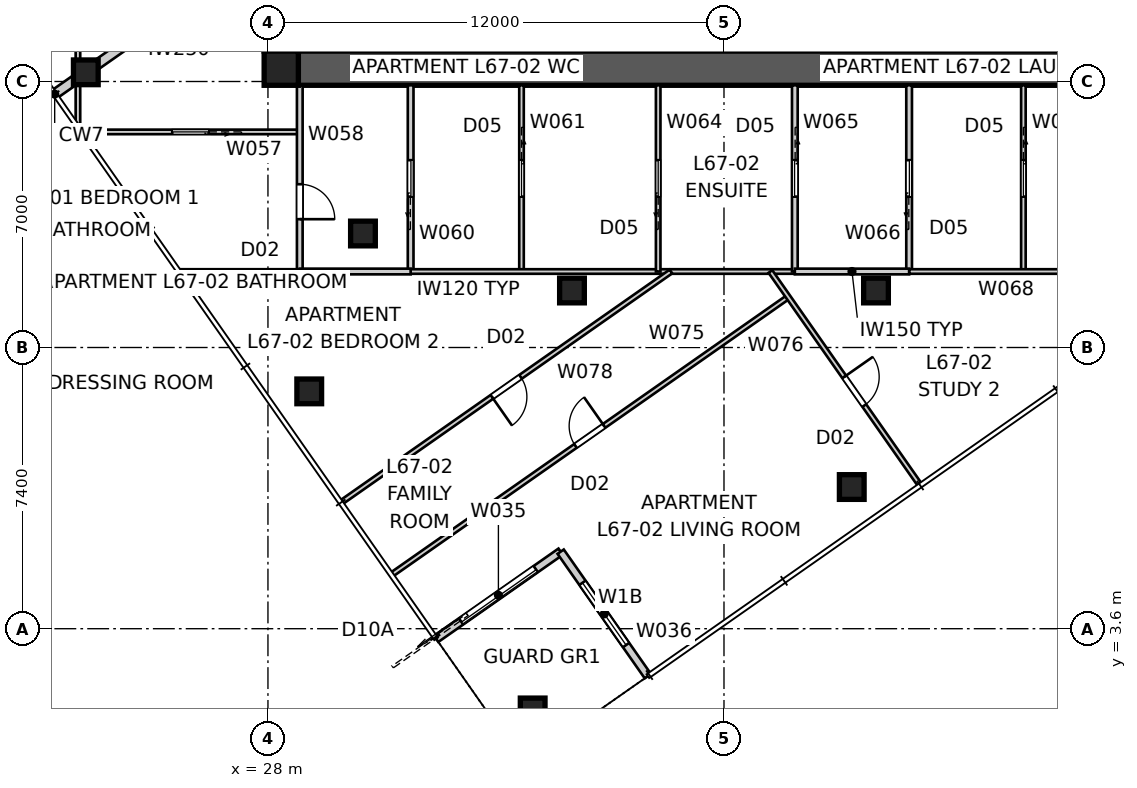
"""IFC4 building model, lengths in metres.
Left out: names, types, materials, properties, quantities, classifications, styles, units other than length and angle.
Written with IfcOpenShell. Run it as: python <this file> out.ifc"""

import sys

from ifc_helpers import new_model, si_unit, direction, frame, frame_2d, origin, origin_2d, place, context, subcontext, project, spatial, polyline, rectangle, outline, extrude, element, fill, save


model = new_model("IFC4")
c1 = context("Model", 3, precision=1e-05, world=origin(), true_north=direction((0.0, 1.0)))
c2 = subcontext(c1, "Body", "Model", "MODEL_VIEW")
j1 = project(units=[si_unit("LENGTHUNIT", "METRE"), si_unit("PLANEANGLEUNIT", "RADIAN")], contexts=[c1])
p1 = place(None, origin())
s1 = spatial("IfcSite", under=j1, at=p1, CompositionType="ELEMENT")
p2 = place(p1, origin())
s2 = spatial("IfcBuilding", under=s1, at=p2, CompositionType="ELEMENT")
p3 = place(p2, frame((0.0, 0.0, 243.8)))
s3 = spatial("IfcBuildingStorey", under=s2, at=p3, CompositionType="ELEMENT", Elevation=243.8)
p4 = place(p3, frame((51.2, 18.35, 0.0), z_axis=(0.0, 0.0, 1.0), x_axis=(-1.0, 0.0, 0.0)))
e1 = element("IfcWall", 1, at=p4, inside=s3, PredefinedType="SHEAR", context=c2, shape_type="SweptSolid", body=[
    extrude(outline(polyline([(0.0, -0.45), (22.4, -0.45), (22.4, -0.025), (22.85, -0.025), (22.85, 0.025), (22.4, 0.025), (22.4, 0.45), (0.0, 0.45), (0.0, 0.025), (-0.45, 0.025), (-0.45, -0.025), (0.0, -0.025), (0.0, -0.45)])), origin(), (0.0, 0.0, 1.0), 3.4),
])
p5 = place(p3, frame((28.35, 41.2, 0.0), z_axis=(0.0, 0.0, 1.0), x_axis=(0.0, -1.0, 0.0)))
e2 = element("IfcWall", 2, at=p5, inside=s3, PredefinedType="SHEAR", context=c2, shape_type="SweptSolid", body=[
    extrude(outline(polyline([(0.0, -0.45), (22.4, -0.45), (22.4, -0.025), (22.85, -0.025), (22.85, 0.025), (22.4, 0.025), (22.4, 0.45), (0.0, 0.45), (0.0, 0.025), (-0.45, 0.025), (-0.45, -0.025), (0.0, -0.025), (0.0, -0.45)])), origin(), (0.0, 0.0, 1.0), 3.4),
])
p6 = place(p5, frame((11.14, 0.0, 0.0)))
e3 = element("IfcOpeningElement", 3, at=p6, cuts=e2, PredefinedType="OPENING", context=c2, shape_type="SweptSolid", body=[
    extrude(rectangle(XDim=1.02, YDim=2.4, at=frame_2d((0.51, 1.2))), frame((0.0, 0.46, 0.0), z_axis=(0.0, -1.0, 0.0), x_axis=(1.0, 0.0, 0.0)), (0.0, 0.0, 1.0), 0.92),
])
p7 = place(p3, frame((28.35, 18.35, 0.0), z_axis=(0.0, 0.0, 1.0), x_axis=(1.0, 0.0, 0.0)))
e4 = element("IfcColumn", 4, at=p7, inside=s3, PredefinedType="COLUMN", context=c2, shape_type="SweptSolid", body=[
    extrude(rectangle(XDim=0.9, YDim=0.9, at=origin_2d()), origin(), (0.0, 0.0, 1.0), 3.4),
])
for number, where, z_axis, x_axis in (
    (5, (34.966, 1.449, 0.0), (0.0, 0.0, 1.0), (1.0, 0.0, 0.0)),
    (6, (43.362, 7.328, 0.0), (0.0, 0.0, 1.0), (1.0, 0.0, 0.0)),
    (7, (23.207, 18.242, 0.0), (0.0, 0.0, 1.0), (1.0, 0.0, 0.0)),
    (8, (29.086, 9.845, 0.0), (0.0, 0.0, 1.0), (1.0, 0.0, 0.0)),
    (9, (30.5, 14.0, 0.0), (0.0, 0.0, 1.0), (1.0, 0.0, 0.0)),
    (10, (36.0, 12.5, 0.0), (0.0, 0.0, 1.0), (1.0, 0.0, 0.0)),
    (11, (44.0, 12.5, 0.0), (0.0, 0.0, 1.0), (1.0, 0.0, 0.0)),
):
    element("IfcColumn", number, at=place(p3, frame(where, z_axis=z_axis, x_axis=x_axis)), inside=s3, PredefinedType="COLUMN", context=c2, shape_type="SweptSolid", body=[
        extrude(rectangle(XDim=0.65, YDim=0.65, at=origin_2d()), origin(), (0.0, 0.0, 1.0), 3.4),
    ])
p8 = place(p3, frame((32.426, 3.333, 0.0), z_axis=(0.0, 0.0, 1.0), x_axis=(0.819165963305, 0.573556557423, 0.0)))
e12 = element("IfcWall", 12, at=p8, inside=s3, PredefinedType="SOLIDWALL", context=c2, shape_type="SweptSolid", body=[
    extrude(rectangle(XDim=4.0, YDim=0.2, at=frame_2d((2.0, 0.0))), origin(), (0.0, 0.0, 1.0), 3.25),
])
p9 = place(p8, frame((0.8, 0.0, 0.0)))
e13 = element("IfcOpeningElement", 13, at=p9, cuts=e12, PredefinedType="OPENING", context=c2, shape_type="SweptSolid", body=[
    extrude(rectangle(XDim=2.4, YDim=2.1, at=frame_2d((1.2, 1.05))), frame((0.0, 0.11, 0.0), z_axis=(0.0, -1.0, 0.0), x_axis=(1.0, 0.0, 0.0)), (0.0, 0.0, 1.0), 0.22),
])
p10 = place(p3, frame((35.702, 5.627, 0.0), z_axis=(0.0, 0.0, 1.0), x_axis=(0.573597512525, -0.819137286189, 0.0)))
e14 = element("IfcWall", 14, at=p10, inside=s3, PredefinedType="SOLIDWALL", context=c2, shape_type="SweptSolid", body=[
    extrude(rectangle(XDim=4.0, YDim=0.2, at=frame_2d((2.0, 0.0))), origin(), (0.0, 0.0, 1.0), 3.25),
])
p11 = place(p10, frame((1.0, 0.0, 0.45)))
e15 = element("IfcOpeningElement", 15, at=p11, cuts=e14, PredefinedType="OPENING", context=c2, shape_type="SweptSolid", body=[
    extrude(rectangle(XDim=2.0, YDim=1.8, at=frame_2d((1.0, 0.9))), frame((0.0, 0.11, 0.0), z_axis=(0.0, -1.0, 0.0), x_axis=(1.0, 0.0, 0.0)), (0.0, 0.0, 1.0), 0.22),
])
p12 = place(p3, frame((22.388, 17.668, 0.0), z_axis=(0.0, 0.0, 1.0), x_axis=(0.819161528122, 0.573562891796, 0.0)))
e16 = element("IfcWall", 16, at=p12, inside=s3, PredefinedType="PARTITIONING", context=c2, shape_type="SweptSolid", body=[
    extrude(rectangle(XDim=6.681, YDim=0.25, at=frame_2d((3.341, 0.0))), origin(), (0.0, 0.0, 1.0), 3.25),
])
p13 = place(p3, frame((23.0, 16.864, 0.0), z_axis=(0.0, 0.0, 1.0), x_axis=(0.0, 1.0, 0.0)))
e17 = element("IfcWall", 17, at=p13, inside=s3, PredefinedType="PARTITIONING", context=c2, shape_type="SweptSolid", body=[
    extrude(rectangle(XDim=19.28, YDim=0.12, at=frame_2d((9.64, 0.0))), origin(), (0.0, 0.0, 1.0), 2.55),
])
p14 = place(p13, frame((9.599, 0.0, 0.0)))
e18 = element("IfcOpeningElement", 18, at=p14, cuts=e17, PredefinedType="OPENING", context=c2, shape_type="SweptSolid", body=[
    extrude(rectangle(XDim=0.92, YDim=2.34, at=frame_2d((0.46, 1.17))), frame((0.0, 0.07, 0.0), z_axis=(0.0, -1.0, 0.0), x_axis=(1.0, 0.0, 0.0)), (0.0, 0.0, 1.0), 0.14),
])
p15 = place(p13, frame((17.603, 0.0, 0.0)))
e19 = element("IfcOpeningElement", 19, at=p15, cuts=e17, PredefinedType="OPENING", context=c2, shape_type="SweptSolid", body=[
    extrude(rectangle(XDim=0.92, YDim=2.34, at=frame_2d((0.46, 1.17))), frame((0.0, 0.07, 0.0), z_axis=(0.0, -1.0, 0.0), x_axis=(1.0, 0.0, 0.0)), (0.0, 0.0, 1.0), 0.14),
])
p16 = place(p13, frame((12.806, 0.0, 0.0)))
e20 = element("IfcOpeningElement", 20, at=p16, cuts=e17, PredefinedType="OPENING", context=c2, shape_type="SweptSolid", body=[
    extrude(rectangle(XDim=0.92, YDim=2.34, at=frame_2d((0.46, 1.17))), frame((0.0, 0.07, 0.0), z_axis=(0.0, -1.0, 0.0), x_axis=(1.0, 0.0, 0.0)), (0.0, 0.0, 1.0), 0.14),
])
p17 = place(p3, frame((28.837, 16.673, 0.0), z_axis=(0.0, 0.0, 1.0), x_axis=(-1.0, 0.0, 0.0)))
e21 = element("IfcWall", 21, at=p17, inside=s3, PredefinedType="PARTITIONING", context=c2, shape_type="SweptSolid", body=[
    extrude(rectangle(XDim=5.704, YDim=0.12, at=frame_2d((2.852, 0.0))), origin(), (0.0, 0.0, 1.0), 3.25),
])
p18 = place(p17, frame((2.396, 0.0, 0.0)))
e22 = element("IfcOpeningElement", 22, at=p18, cuts=e21, PredefinedType="OPENING", context=c2, shape_type="SweptSolid", body=[
    extrude(rectangle(XDim=0.96, YDim=2.1, at=frame_2d((0.48, 1.05))), frame((0.0, 0.07, 0.0), z_axis=(0.0, -1.0, 0.0), x_axis=(1.0, 0.0, 0.0)), (0.0, 0.0, 1.0), 0.14),
])
p19 = place(p3, frame((28.837, 17.9, 0.0), z_axis=(0.0, 0.0, 1.0), x_axis=(0.0, -1.0, 0.0)))
e23 = element("IfcWall", 23, at=p19, inside=s3, PredefinedType="SOLIDWALL", context=c2, shape_type="SweptSolid", body=[
    extrude(rectangle(XDim=4.9, YDim=0.15, at=frame_2d((2.45, 0.0))), origin(), (0.0, 0.0, 1.0), 3.25),
])
p20 = place(p19, frame((2.603, 0.0, 0.0)))
e24 = element("IfcOpeningElement", 24, at=p20, cuts=e23, PredefinedType="OPENING", context=c2, shape_type="SweptSolid", body=[
    extrude(rectangle(XDim=0.92, YDim=2.34, at=frame_2d((0.46, 1.17))), frame((0.0, 0.085, 0.0), z_axis=(0.0, -1.0, 0.0), x_axis=(1.0, 0.0, 0.0)), (0.0, 0.0, 1.0), 0.17),
])
p21 = place(p3, frame((28.837, 13.0, 0.0), z_axis=(0.0, 0.0, 1.0), x_axis=(-1.0, 0.0, 0.0)))
e25 = element("IfcWall", 25, at=p21, inside=s3, PredefinedType="PARTITIONING", context=c2, shape_type="SweptSolid", body=[
    extrude(rectangle(XDim=3.132, YDim=0.12, at=frame_2d((1.566, 0.0))), origin(), (0.0, 0.0, 1.0), 3.25),
])
p22 = place(p3, frame((31.755, 13.0, 0.0), z_axis=(0.0, 0.0, 1.0), x_axis=(0.0, 1.0, 0.0)))
e26 = element("IfcWall", 26, at=p22, inside=s3, PredefinedType="SOLIDWALL", context=c2, shape_type="SweptSolid", body=[
    extrude(rectangle(XDim=4.9, YDim=0.15, at=frame_2d((2.45, 0.0))), origin(), (0.0, 0.0, 1.0), 3.25),
])
p23 = place(p22, frame((1.97, 0.0, 0.0)))
e27 = element("IfcOpeningElement", 27, at=p23, cuts=e26, PredefinedType="OPENING", context=c2, shape_type="SweptSolid", body=[
    extrude(rectangle(XDim=0.96, YDim=2.1, at=frame_2d((0.48, 1.05))), frame((0.0, 0.085, 0.0), z_axis=(0.0, -1.0, 0.0), x_axis=(1.0, 0.0, 0.0)), (0.0, 0.0, 1.0), 0.17),
])
p24 = place(p3, frame((34.672, 17.9, 0.0), z_axis=(0.0, 0.0, 1.0), x_axis=(0.0, -1.0, 0.0)))
e28 = element("IfcWall", 28, at=p24, inside=s3, PredefinedType="PARTITIONING", context=c2, shape_type="SweptSolid", body=[
    extrude(rectangle(XDim=4.9, YDim=0.12, at=frame_2d((2.45, 0.0))), origin(), (0.0, 0.0, 1.0), 3.25),
])
p25 = place(p24, frame((1.97, 0.0, 0.0)))
e29 = element("IfcOpeningElement", 29, at=p25, cuts=e28, PredefinedType="OPENING", context=c2, shape_type="SweptSolid", body=[
    extrude(rectangle(XDim=0.96, YDim=2.1, at=frame_2d((0.48, 1.05))), frame((0.0, 0.07, 0.0), z_axis=(0.0, -1.0, 0.0), x_axis=(1.0, 0.0, 0.0)), (0.0, 0.0, 1.0), 0.14),
])
p26 = place(p3, frame((41.865, 13.0, 0.0), z_axis=(0.0, 0.0, 1.0), x_axis=(-1.0, 0.0, 0.0)))
e30 = element("IfcWall", 30, at=p26, inside=s3, PredefinedType="PARTITIONING", context=c2, shape_type="SweptSolid", body=[
    extrude(rectangle(XDim=10.11, YDim=0.12, at=frame_2d((5.055, 0.0))), origin(), (0.0, 0.0, 1.0), 2.55),
])
p27 = place(p3, frame((31.755, 13.0, 0.0), z_axis=(0.0, 0.0, 1.0), x_axis=(-1.0, 0.0, 0.0)))
e31 = element("IfcWall", 31, at=p27, inside=s3, PredefinedType="SOLIDWALL", context=c2, shape_type="SweptSolid", body=[
    extrude(rectangle(XDim=2.917, YDim=0.15, at=frame_2d((1.458, 0.0))), origin(), (0.0, 0.0, 1.0), 3.25),
])
p28 = place(p3, frame((38.268, 13.0, 0.0), z_axis=(0.0, 0.0, 1.0), x_axis=(0.0, 1.0, 0.0)))
e32 = element("IfcWall", 32, at=p28, inside=s3, PredefinedType="PARTITIONING", context=c2, shape_type="SweptSolid", body=[
    extrude(rectangle(XDim=4.9, YDim=0.12, at=frame_2d((2.45, 0.0))), origin(), (0.0, 0.0, 1.0), 3.25),
])
p29 = place(p28, frame((1.97, 0.0, 0.0)))
e33 = element("IfcOpeningElement", 33, at=p29, cuts=e32, PredefinedType="OPENING", context=c2, shape_type="SweptSolid", body=[
    extrude(rectangle(XDim=0.96, YDim=2.1, at=frame_2d((0.48, 1.05))), frame((0.0, 0.07, 0.0), z_axis=(0.0, -1.0, 0.0), x_axis=(1.0, 0.0, 0.0)), (0.0, 0.0, 1.0), 0.14),
])
p30 = place(p3, frame((41.865, 17.9, 0.0), z_axis=(0.0, 0.0, 1.0), x_axis=(0.0, -1.0, 0.0)))
e34 = element("IfcWall", 34, at=p30, inside=s3, PredefinedType="SOLIDWALL", context=c2, shape_type="SweptSolid", body=[
    extrude(rectangle(XDim=4.9, YDim=0.15, at=frame_2d((2.45, 0.0))), origin(), (0.0, 0.0, 1.0), 3.25),
])
p31 = place(p30, frame((1.97, 0.0, 0.0)))
e35 = element("IfcOpeningElement", 35, at=p31, cuts=e34, PredefinedType="OPENING", context=c2, shape_type="SweptSolid", body=[
    extrude(rectangle(XDim=0.96, YDim=2.1, at=frame_2d((0.48, 1.05))), frame((0.0, 0.085, 0.0), z_axis=(0.0, -1.0, 0.0), x_axis=(1.0, 0.0, 0.0)), (0.0, 0.0, 1.0), 0.17),
])
p32 = place(p3, frame((44.871, 13.0, 0.0), z_axis=(0.0, 0.0, 1.0), x_axis=(0.0, 1.0, 0.0)))
e36 = element("IfcWall", 36, at=p32, inside=s3, PredefinedType="SOLIDWALL", context=c2, shape_type="SweptSolid", body=[
    extrude(rectangle(XDim=4.9, YDim=0.15, at=frame_2d((2.45, 0.0))), origin(), (0.0, 0.0, 1.0), 3.25),
])
p33 = place(p32, frame((1.97, 0.0, 0.0)))
e37 = element("IfcOpeningElement", 37, at=p33, cuts=e36, PredefinedType="OPENING", context=c2, shape_type="SweptSolid", body=[
    extrude(rectangle(XDim=0.96, YDim=2.1, at=frame_2d((0.48, 1.05))), frame((0.0, 0.085, 0.0), z_axis=(0.0, -1.0, 0.0), x_axis=(1.0, 0.0, 0.0)), (0.0, 0.0, 1.0), 0.17),
])
p34 = place(p3, frame((47.878, 17.9, 0.0), z_axis=(0.0, 0.0, 1.0), x_axis=(0.0, -1.0, 0.0)))
e38 = element("IfcWall", 38, at=p34, inside=s3, PredefinedType="PARTITIONING", context=c2, shape_type="SweptSolid", body=[
    extrude(rectangle(XDim=4.9, YDim=0.12, at=frame_2d((2.45, 0.0))), origin(), (0.0, 0.0, 1.0), 3.25),
])
p35 = place(p34, frame((1.97, 0.0, 0.0)))
e39 = element("IfcOpeningElement", 39, at=p35, cuts=e38, PredefinedType="OPENING", context=c2, shape_type="SweptSolid", body=[
    extrude(rectangle(XDim=0.96, YDim=2.1, at=frame_2d((0.48, 1.05))), frame((0.0, 0.07, 0.0), z_axis=(0.0, -1.0, 0.0), x_axis=(1.0, 0.0, 0.0)), (0.0, 0.0, 1.0), 0.14),
])
p36 = place(p3, frame((52.109, 13.0, 0.0), z_axis=(0.0, 0.0, 1.0), x_axis=(-1.0, 0.0, 0.0)))
e40 = element("IfcWall", 40, at=p36, inside=s3, PredefinedType="PARTITIONING", context=c2, shape_type="SweptSolid", body=[
    extrude(rectangle(XDim=7.238, YDim=0.12, at=frame_2d((3.619, 0.0))), origin(), (0.0, 0.0, 1.0), 2.55),
])
p37 = place(p36, frame((1.205, 0.0, 0.0)))
e41 = element("IfcOpeningElement", 41, at=p37, cuts=e40, PredefinedType="OPENING", context=c2, shape_type="SweptSolid", body=[
    extrude(rectangle(XDim=0.92, YDim=2.34, at=frame_2d((0.46, 1.17))), frame((0.0, 0.07, 0.0), z_axis=(0.0, -1.0, 0.0), x_axis=(1.0, 0.0, 0.0)), (0.0, 0.0, 1.0), 0.14),
])
p38 = place(p3, frame((44.871, 13.0, 0.0), z_axis=(0.0, 0.0, 1.0), x_axis=(-1.0, 0.0, 0.0)))
e42 = element("IfcWall", 42, at=p38, inside=s3, PredefinedType="SOLIDWALL", context=c2, shape_type="SweptSolid", body=[
    extrude(rectangle(XDim=3.007, YDim=0.15, at=frame_2d((1.503, 0.0))), origin(), (0.0, 0.0, 1.0), 3.25),
])
p39 = place(p3, frame((31.279, 5.04, 0.0), z_axis=(0.0, 0.0, 1.0), x_axis=(0.819155207289, 0.573571919092, 0.0)))
e43 = element("IfcWall", 43, at=p39, inside=s3, PredefinedType="PARTITIONING", context=c2, shape_type="SweptSolid", body=[
    extrude(rectangle(XDim=12.71, YDim=0.12, at=frame_2d((6.355, 0.0))), origin(), (0.0, 0.0, 1.0), 2.717),
])
p40 = place(p39, frame((5.875, 0.0, 0.0)))
e44 = element("IfcOpeningElement", 44, at=p40, cuts=e43, PredefinedType="OPENING", context=c2, shape_type="SweptSolid", body=[
    extrude(rectangle(XDim=0.92, YDim=2.34, at=frame_2d((0.46, 1.17))), frame((0.0, 0.07, 0.0), z_axis=(0.0, -1.0, 0.0), x_axis=(1.0, 0.0, 0.0)), (0.0, 0.0, 1.0), 0.14),
])
p41 = place(p3, frame((41.222, 13.0, 0.0), z_axis=(0.0, 0.0, 1.0), x_axis=(0.57357503053, -0.819153028653, 0.0)))
e45 = element("IfcWall", 45, at=p41, inside=s3, PredefinedType="PARTITIONING", context=c2, shape_type="SweptSolid", body=[
    extrude(rectangle(XDim=6.834, YDim=0.12, at=frame_2d((3.417, 0.0))), origin(), (0.0, 0.0, 1.0), 3.25),
])
p42 = place(p41, frame((3.386, 0.0, 0.0)))
e46 = element("IfcOpeningElement", 46, at=p42, cuts=e45, PredefinedType="OPENING", context=c2, shape_type="SweptSolid", body=[
    extrude(rectangle(XDim=0.92, YDim=2.34, at=frame_2d((0.46, 1.17))), frame((0.0, 0.07, 0.0), z_axis=(0.0, -1.0, 0.0), x_axis=(1.0, 0.0, 0.0)), (0.0, 0.0, 1.0), 0.14),
])
p43 = place(p3, frame((38.604, 13.0, 0.0), z_axis=(0.0, 0.0, 1.0), x_axis=(-0.819123352089, -0.573617410878, 0.0)))
e47 = element("IfcWall", 47, at=p43, inside=s3, PredefinedType="PARTITIONING", context=c2, shape_type="SweptSolid", body=[
    extrude(rectangle(XDim=10.566, YDim=0.12, at=frame_2d((5.283, 0.0))), origin(), (0.0, 0.0, 1.0), 3.25),
])
p44 = place(p43, frame((4.831, 0.0, 0.0)))
e48 = element("IfcOpeningElement", 48, at=p44, cuts=e47, PredefinedType="OPENING", context=c2, shape_type="SweptSolid", body=[
    extrude(rectangle(XDim=0.92, YDim=2.34, at=frame_2d((0.46, 1.17))), frame((0.0, 0.07, 0.0), z_axis=(0.0, -1.0, 0.0), x_axis=(1.0, 0.0, 0.0)), (0.0, 0.0, 1.0), 0.14),
])
p45 = place(p9, origin())
e49 = element("IfcDoor", 49, at=p45, inside=s3, OperationType="SLIDING_TO_LEFT", PredefinedType="DOOR", context=c2, shape_type="SweptSolid", body=[
    extrude(rectangle(XDim=2.4, YDim=2.1, at=frame_2d((1.2, 1.05))), frame((0.0, 0.025, 0.0), z_axis=(0.0, -1.0, 0.0), x_axis=(1.0, 0.0, 0.0)), (0.0, 0.0, 1.0), 0.05),
])
fill(e13, e49)
p46 = place(p11, origin())
e50 = element("IfcWindow", 50, at=p46, inside=s3, PartitioningType="SINGLE_PANEL", PredefinedType="WINDOW", context=c2, shape_type="SweptSolid", body=[
    extrude(rectangle(XDim=2.0, YDim=1.8, at=frame_2d((1.0, 0.9))), frame((0.0, 0.03, 0.0), z_axis=(0.0, -1.0, 0.0), x_axis=(1.0, 0.0, 0.0)), (0.0, 0.0, 1.0), 0.06),
])
fill(e15, e50)
p47 = place(p35, origin())
e51 = element("IfcDoor", 51, at=p47, inside=s3, OperationType="SLIDING_TO_LEFT", PredefinedType="DOOR", context=c2, shape_type="SweptSolid", body=[
    extrude(rectangle(XDim=0.96, YDim=2.1, at=frame_2d((0.48, 1.05))), frame((0.0, 0.025, 0.0), z_axis=(0.0, -1.0, 0.0), x_axis=(1.0, 0.0, 0.0)), (0.0, 0.0, 1.0), 0.05),
])
fill(e39, e51)
p48 = place(p33, origin())
e52 = element("IfcDoor", 52, at=p48, inside=s3, OperationType="SLIDING_TO_LEFT", PredefinedType="DOOR", context=c2, shape_type="SweptSolid", body=[
    extrude(rectangle(XDim=0.96, YDim=2.1, at=frame_2d((0.48, 1.05))), frame((0.0, 0.025, 0.0), z_axis=(0.0, -1.0, 0.0), x_axis=(1.0, 0.0, 0.0)), (0.0, 0.0, 1.0), 0.05),
])
fill(e37, e52)
p49 = place(p42, origin())
e53 = element("IfcDoor", 53, at=p49, inside=s3, OperationType="SINGLE_SWING_LEFT", PredefinedType="DOOR", context=c2, shape_type="SweptSolid", body=[
    extrude(rectangle(XDim=0.92, YDim=2.34, at=frame_2d((0.46, 1.17))), frame((0.0, 0.025, 0.0), z_axis=(0.0, -1.0, 0.0), x_axis=(1.0, 0.0, 0.0)), (0.0, 0.0, 1.0), 0.05),
])
fill(e46, e53)
p50 = place(p31, origin())
e54 = element("IfcDoor", 54, at=p50, inside=s3, OperationType="SLIDING_TO_LEFT", PredefinedType="DOOR", context=c2, shape_type="SweptSolid", body=[
    extrude(rectangle(XDim=0.96, YDim=2.1, at=frame_2d((0.48, 1.05))), frame((0.0, 0.025, 0.0), z_axis=(0.0, -1.0, 0.0), x_axis=(1.0, 0.0, 0.0)), (0.0, 0.0, 1.0), 0.05),
])
fill(e35, e54)
p51 = place(p40, origin())
e55 = element("IfcDoor", 55, at=p51, inside=s3, OperationType="SINGLE_SWING_RIGHT", PredefinedType="DOOR", context=c2, shape_type="SweptSolid", body=[
    extrude(rectangle(XDim=0.92, YDim=2.34, at=frame_2d((0.46, 1.17))), frame((0.0, 0.025, 0.0), z_axis=(0.0, -1.0, 0.0), x_axis=(1.0, 0.0, 0.0)), (0.0, 0.0, 1.0), 0.05),
])
fill(e44, e55)
p52 = place(p29, origin())
e56 = element("IfcDoor", 56, at=p52, inside=s3, OperationType="SLIDING_TO_LEFT", PredefinedType="DOOR", context=c2, shape_type="SweptSolid", body=[
    extrude(rectangle(XDim=0.96, YDim=2.1, at=frame_2d((0.48, 1.05))), frame((0.0, 0.025, 0.0), z_axis=(0.0, -1.0, 0.0), x_axis=(1.0, 0.0, 0.0)), (0.0, 0.0, 1.0), 0.05),
])
fill(e33, e56)
p53 = place(p44, origin())
e57 = element("IfcDoor", 57, at=p53, inside=s3, OperationType="SINGLE_SWING_RIGHT", PredefinedType="DOOR", context=c2, shape_type="SweptSolid", body=[
    extrude(rectangle(XDim=0.92, YDim=2.34, at=frame_2d((0.46, 1.17))), frame((0.0, 0.025, 0.0), z_axis=(0.0, -1.0, 0.0), x_axis=(1.0, 0.0, 0.0)), (0.0, 0.0, 1.0), 0.05),
])
fill(e48, e57)
p54 = place(p25, origin())
e58 = element("IfcDoor", 58, at=p54, inside=s3, OperationType="SLIDING_TO_LEFT", PredefinedType="DOOR", context=c2, shape_type="SweptSolid", body=[
    extrude(rectangle(XDim=0.96, YDim=2.1, at=frame_2d((0.48, 1.05))), frame((0.0, 0.025, 0.0), z_axis=(0.0, -1.0, 0.0), x_axis=(1.0, 0.0, 0.0)), (0.0, 0.0, 1.0), 0.05),
])
fill(e29, e58)
p55 = place(p23, origin())
e59 = element("IfcDoor", 59, at=p55, inside=s3, OperationType="SLIDING_TO_LEFT", PredefinedType="DOOR", context=c2, shape_type="SweptSolid", body=[
    extrude(rectangle(XDim=0.96, YDim=2.1, at=frame_2d((0.48, 1.05))), frame((0.0, 0.025, 0.0), z_axis=(0.0, -1.0, 0.0), x_axis=(1.0, 0.0, 0.0)), (0.0, 0.0, 1.0), 0.05),
])
fill(e27, e59)
p56 = place(p20, origin())
e60 = element("IfcDoor", 60, at=p56, inside=s3, OperationType="SINGLE_SWING_RIGHT", PredefinedType="DOOR", context=c2, shape_type="SweptSolid", body=[
    extrude(rectangle(XDim=0.92, YDim=2.34, at=frame_2d((0.46, 1.17))), frame((0.0, 0.025, 0.0), z_axis=(0.0, -1.0, 0.0), x_axis=(1.0, 0.0, 0.0)), (0.0, 0.0, 1.0), 0.05),
])
fill(e24, e60)
p57 = place(p18, origin())
e61 = element("IfcDoor", 61, at=p57, inside=s3, OperationType="SLIDING_TO_LEFT", PredefinedType="DOOR", context=c2, shape_type="SweptSolid", body=[
    extrude(rectangle(XDim=0.96, YDim=2.1, at=frame_2d((0.48, 1.05))), frame((0.0, 0.025, 0.0), z_axis=(0.0, -1.0, 0.0), x_axis=(1.0, 0.0, 0.0)), (0.0, 0.0, 1.0), 0.05),
])
fill(e22, e61)
save(model, sys.argv[1])
